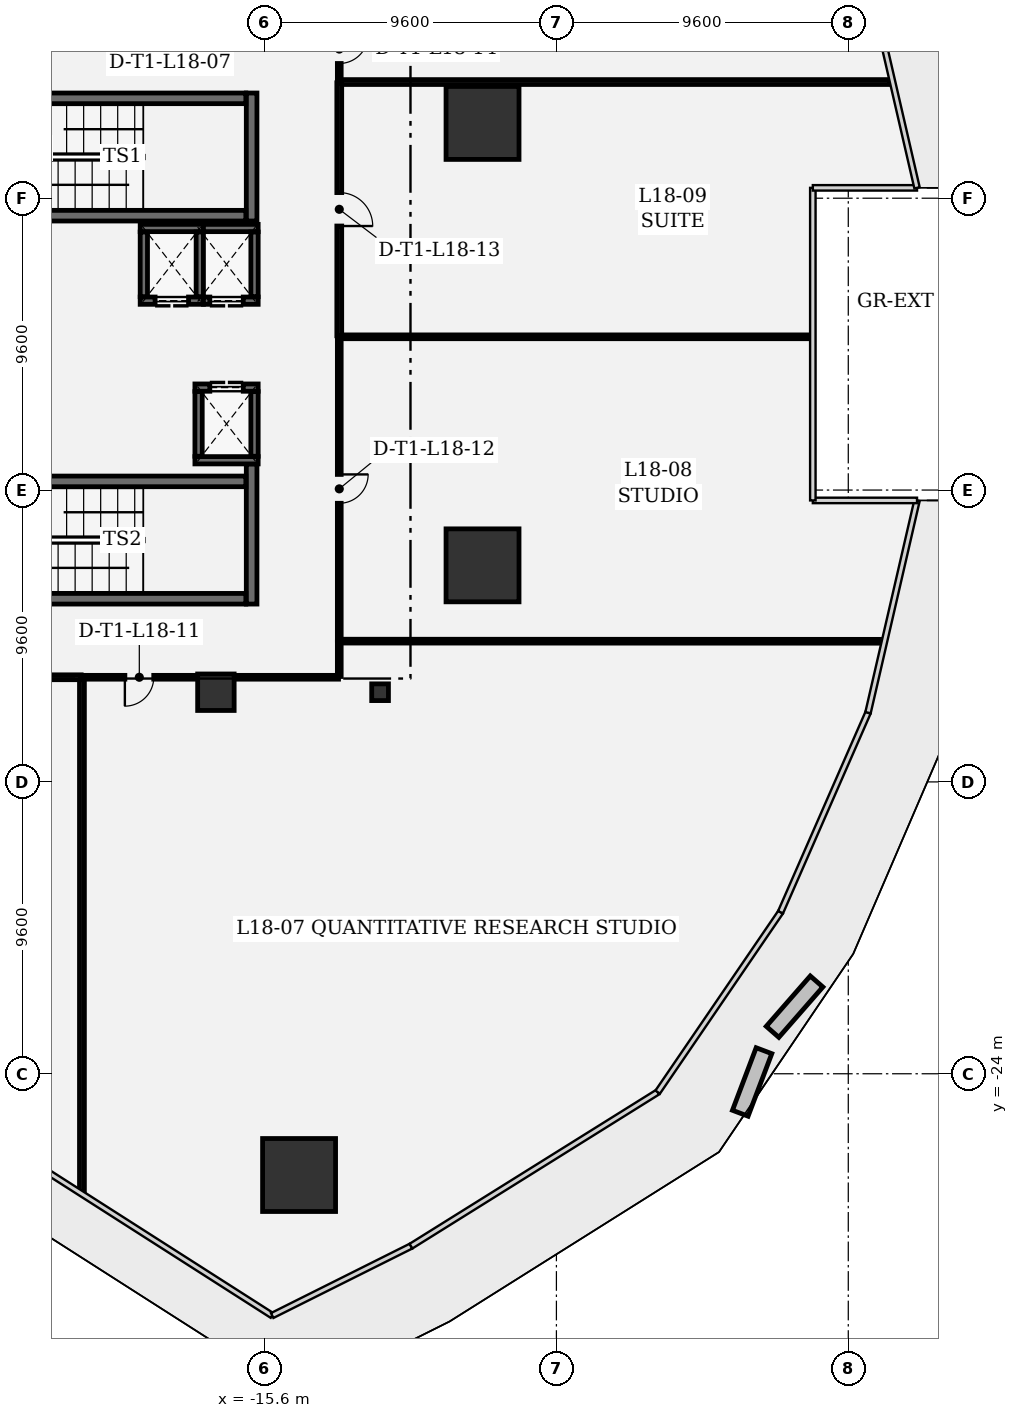
"""IFC4 building model, lengths in metres.
Left out: names, types, materials, properties, quantities, classifications, styles, units other than length and angle.
Written with IfcOpenShell. Run it as: python <this file> out.ifc"""

import sys

from ifc_helpers import new_model, si_unit, direction, frame, frame_2d, origin, origin_2d, place, context, subcontext, project, spatial, rectangle, extrude, element, fill, save


model = new_model("IFC4")
c1 = context("Model", 3, precision=1e-05, world=origin(), true_north=direction((0.0, 1.0)))
c2 = subcontext(c1, "Body", "Model", "MODEL_VIEW")
j1 = project(units=[si_unit("LENGTHUNIT", "METRE"), si_unit("PLANEANGLEUNIT", "RADIAN")], contexts=[c1])
p1 = place(None, origin())
s1 = spatial("IfcSite", under=j1, at=p1, CompositionType="ELEMENT")
p2 = place(p1, origin())
s2 = spatial("IfcBuilding", under=s1, at=p2, CompositionType="ELEMENT")
p3 = place(p2, frame((0.0, 0.0, 82.8)))
s3 = spatial("IfcBuildingStorey", under=s2, at=p3, CompositionType="ELEMENT", Elevation=82.8)
for number, where, z_axis, x_axis in (
    (1, (-14.464, -27.331, 0.0), (0.0, 0.0, 1.0), (1.0, 0.0, 0.0)),
    (2, (-8.43, -7.276, 0.0), (0.0, 0.0, 1.0), (1.0, 0.0, 0.0)),
    (3, (-8.43, 7.276, 0.0), (0.0, 0.0, 1.0), (1.0, 0.0, 0.0)),
):
    element("IfcColumn", number, at=place(p3, frame(where, z_axis=z_axis, x_axis=x_axis)), inside=s3, PredefinedType="COLUMN", context=c2, shape_type="SweptSolid", body=[
        extrude(rectangle(XDim=2.4, YDim=2.4, at=origin_2d()), origin(), (0.0, 0.0, 1.0), 4.2),
    ])
p4 = place(p3, frame((-17.2, -11.45, 0.0), z_axis=(0.0, 0.0, 1.0), x_axis=(1.0, 0.0, 0.0)))
e4 = element("IfcColumn", 4, at=p4, inside=s3, PredefinedType="COLUMN", context=c2, shape_type="SweptSolid", body=[
    extrude(rectangle(XDim=1.2, YDim=1.2, at=origin_2d()), origin(), (0.0, 0.0, 1.0), 4.2),
])
p5 = place(p3, frame((-11.8, -11.45, 0.0), z_axis=(0.0, 0.0, 1.0), x_axis=(1.0, 0.0, 0.0)))
e5 = element("IfcColumn", 5, at=p5, inside=s3, PredefinedType="COLUMN", context=c2, shape_type="SweptSolid", body=[
    extrude(rectangle(XDim=0.55, YDim=0.55, at=origin_2d()), origin(), (0.0, 0.0, 1.0), 4.2),
])
p6 = place(p3, frame((-16.025, 4.05, 0.0), z_axis=(0.0, 0.0, 1.0), x_axis=(0.0, 1.0, 0.0)))
e6 = element("IfcWall", 6, at=p6, inside=s3, PredefinedType="SHEAR", context=c2, shape_type="SweptSolid", body=[
    extrude(rectangle(XDim=4.21, YDim=0.35, at=frame_2d((2.105, 0.0))), origin(), (0.0, 0.0, 1.0), 3.92),
])
p7 = place(p3, frame((-24.335, 4.225, 0.0), z_axis=(0.0, 0.0, 1.0), x_axis=(1.0, 0.0, 0.0)))
e7 = element("IfcWall", 7, at=p7, inside=s3, PredefinedType="SHEAR", context=c2, shape_type="SweptSolid", body=[
    extrude(rectangle(XDim=8.12, YDim=0.35, at=frame_2d((4.06, 0.0))), origin(), (0.0, 0.0, 1.0), 3.92),
])
p8 = place(p3, frame((-16.215, 8.085, 0.0), z_axis=(0.0, 0.0, 1.0), x_axis=(-1.0, 0.0, 0.0)))
e8 = element("IfcWall", 8, at=p8, inside=s3, PredefinedType="SHEAR", context=c2, shape_type="SweptSolid", body=[
    extrude(rectangle(XDim=8.12, YDim=0.35, at=frame_2d((4.06, 0.0))), origin(), (0.0, 0.0, 1.0), 3.92),
])
p9 = place(p8, frame((6.74, 0.0, 0.0)))
e9 = element("IfcOpeningElement", 9, at=p9, cuts=e8, PredefinedType="OPENING", context=c2, shape_type="SweptSolid", body=[
    extrude(rectangle(XDim=1.1, YDim=2.2, at=frame_2d((0.55, 1.1))), frame((0.0, 0.185, 0.0), z_axis=(0.0, -1.0, 0.0), x_axis=(1.0, 0.0, 0.0)), (0.0, 0.0, 1.0), 0.37),
])
p10 = place(p3, frame((-16.025, -8.55, 0.0), z_axis=(0.0, 0.0, 1.0), x_axis=(0.0, 1.0, 0.0)))
e10 = element("IfcWall", 10, at=p10, inside=s3, PredefinedType="SHEAR", context=c2, shape_type="SweptSolid", body=[
    extrude(rectangle(XDim=4.61, YDim=0.35, at=frame_2d((2.305, 0.0))), origin(), (0.0, 0.0, 1.0), 3.92),
])
p11 = place(p3, frame((-24.335, -8.375, 0.0), z_axis=(0.0, 0.0, 1.0), x_axis=(1.0, 0.0, 0.0)))
e11 = element("IfcWall", 11, at=p11, inside=s3, PredefinedType="SHEAR", context=c2, shape_type="SweptSolid", body=[
    extrude(rectangle(XDim=8.12, YDim=0.35, at=frame_2d((4.06, 0.0))), origin(), (0.0, 0.0, 1.0), 3.92),
])
p12 = place(p11, frame((0.28, 0.0, 0.0)))
e12 = element("IfcOpeningElement", 12, at=p12, cuts=e11, PredefinedType="OPENING", context=c2, shape_type="SweptSolid", body=[
    extrude(rectangle(XDim=1.1, YDim=2.2, at=frame_2d((0.55, 1.1))), frame((0.0, 0.185, 0.0), z_axis=(0.0, -1.0, 0.0), x_axis=(1.0, 0.0, 0.0)), (0.0, 0.0, 1.0), 0.37),
])
p13 = place(p3, frame((-16.215, -4.515, 0.0), z_axis=(0.0, 0.0, 1.0), x_axis=(-1.0, 0.0, 0.0)))
e13 = element("IfcWall", 13, at=p13, inside=s3, PredefinedType="SHEAR", context=c2, shape_type="SweptSolid", body=[
    extrude(rectangle(XDim=8.12, YDim=0.35, at=frame_2d((4.06, 0.0))), origin(), (0.0, 0.0, 1.0), 3.92),
])
p14 = place(p3, frame((-17.61, 1.43, 0.0), z_axis=(0.0, 0.0, 1.0), x_axis=(-1.0, 0.0, 0.0)))
e14 = element("IfcWall", 14, at=p14, inside=s3, PredefinedType="SHEAR", context=c2, shape_type="SweptSolid", body=[
    extrude(rectangle(XDim=2.08, YDim=0.24, at=frame_2d((1.04, 0.0))), origin(), (0.0, 0.0, 1.0), 3.92),
])
p15 = place(p14, frame((0.49, 0.0, 0.0)))
e15 = element("IfcOpeningElement", 15, at=p15, cuts=e14, PredefinedType="OPENING", context=c2, shape_type="SweptSolid", body=[
    extrude(rectangle(XDim=1.1, YDim=2.2, at=frame_2d((0.55, 1.1))), frame((0.0, 0.13, 0.0), z_axis=(0.0, -1.0, 0.0), x_axis=(1.0, 0.0, 0.0)), (0.0, 0.0, 1.0), 0.26),
])
p16 = place(p3, frame((-19.69, 3.82, 0.0), z_axis=(0.0, 0.0, 1.0), x_axis=(1.0, 0.0, 0.0)))
e16 = element("IfcWall", 16, at=p16, inside=s3, PredefinedType="SHEAR", context=c2, shape_type="SweptSolid", body=[
    extrude(rectangle(XDim=2.08, YDim=0.24, at=frame_2d((1.04, 0.0))), origin(), (0.0, 0.0, 1.0), 3.92),
])
for number, where, z_axis, x_axis in (
    (17, (-19.57, 1.562, 0.0), (0.0, 0.0, 1.0), (0.0, 1.0, 0.0)),
    (18, (-17.73, 3.688, 0.0), (0.0, 0.0, 1.0), (0.0, -1.0, 0.0)),
):
    element("IfcWall", number, at=place(p3, frame(where, z_axis=z_axis, x_axis=x_axis)), inside=s3, PredefinedType="SHEAR", context=c2, shape_type="SweptSolid", body=[
        extrude(rectangle(XDim=2.126, YDim=0.24, at=frame_2d((1.063, 0.0))), origin(), (0.0, 0.0, 1.0), 3.92),
    ])
p17 = place(p3, frame((-15.81, 1.43, 0.0), z_axis=(0.0, 0.0, 1.0), x_axis=(-1.0, 0.0, 0.0)))
e19 = element("IfcWall", 19, at=p17, inside=s3, PredefinedType="SHEAR", context=c2, shape_type="SweptSolid", body=[
    extrude(rectangle(XDim=1.8, YDim=0.24, at=frame_2d((0.9, 0.0))), origin(), (0.0, 0.0, 1.0), 3.92),
])
p18 = place(p17, frame((0.49, 0.0, 0.0)))
e20 = element("IfcOpeningElement", 20, at=p18, cuts=e19, PredefinedType="OPENING", context=c2, shape_type="SweptSolid", body=[
    extrude(rectangle(XDim=1.1, YDim=2.2, at=frame_2d((0.55, 1.1))), frame((0.0, 0.13, 0.0), z_axis=(0.0, -1.0, 0.0), x_axis=(1.0, 0.0, 0.0)), (0.0, 0.0, 1.0), 0.26),
])
p19 = place(p3, frame((-17.61, 3.82, 0.0), z_axis=(0.0, 0.0, 1.0), x_axis=(1.0, 0.0, 0.0)))
e21 = element("IfcWall", 21, at=p19, inside=s3, PredefinedType="SHEAR", context=c2, shape_type="SweptSolid", body=[
    extrude(rectangle(XDim=1.8, YDim=0.24, at=frame_2d((0.9, 0.0))), origin(), (0.0, 0.0, 1.0), 3.92),
])
p20 = place(p3, frame((-15.93, 3.688, 0.0), z_axis=(0.0, 0.0, 1.0), x_axis=(0.0, -1.0, 0.0)))
e22 = element("IfcWall", 22, at=p20, inside=s3, PredefinedType="SHEAR", context=c2, shape_type="SweptSolid", body=[
    extrude(rectangle(XDim=2.126, YDim=0.24, at=frame_2d((1.063, 0.0))), origin(), (0.0, 0.0, 1.0), 3.92),
])
p21 = place(p3, frame((-15.81, -3.82, 0.0), z_axis=(0.0, 0.0, 1.0), x_axis=(-1.0, 0.0, 0.0)))
e23 = element("IfcWall", 23, at=p21, inside=s3, PredefinedType="SHEAR", context=c2, shape_type="SweptSolid", body=[
    extrude(rectangle(XDim=2.08, YDim=0.24, at=frame_2d((1.04, 0.0))), origin(), (0.0, 0.0, 1.0), 3.92),
])
p22 = place(p3, frame((-17.89, -1.43, 0.0), z_axis=(0.0, 0.0, 1.0), x_axis=(1.0, 0.0, 0.0)))
e24 = element("IfcWall", 24, at=p22, inside=s3, PredefinedType="SHEAR", context=c2, shape_type="SweptSolid", body=[
    extrude(rectangle(XDim=2.08, YDim=0.24, at=frame_2d((1.04, 0.0))), origin(), (0.0, 0.0, 1.0), 3.92),
])
p23 = place(p22, frame((0.49, 0.0, 0.0)))
e25 = element("IfcOpeningElement", 25, at=p23, cuts=e24, PredefinedType="OPENING", context=c2, shape_type="SweptSolid", body=[
    extrude(rectangle(XDim=1.1, YDim=2.2, at=frame_2d((0.55, 1.1))), frame((0.0, 0.13, 0.0), z_axis=(0.0, -1.0, 0.0), x_axis=(1.0, 0.0, 0.0)), (0.0, 0.0, 1.0), 0.26),
])
for number, where, z_axis, x_axis in (
    (26, (-17.77, -3.688, 0.0), (0.0, 0.0, 1.0), (0.0, 1.0, 0.0)),
    (27, (-15.93, -1.562, 0.0), (0.0, 0.0, 1.0), (0.0, -1.0, 0.0)),
):
    element("IfcWall", number, at=place(p3, frame(where, z_axis=z_axis, x_axis=x_axis)), inside=s3, PredefinedType="SHEAR", context=c2, shape_type="SweptSolid", body=[
        extrude(rectangle(XDim=2.126, YDim=0.24, at=frame_2d((1.063, 0.0))), origin(), (0.0, 0.0, 1.0), 3.92),
    ])
p24 = place(p3, frame((-21.606, -27.874, 0.0), z_axis=(0.0, 0.0, 1.0), x_axis=(0.0, 1.0, 0.0)))
e28 = element("IfcWall", 28, at=p24, inside=s3, PredefinedType="PARTITIONING", context=c2, shape_type="SweptSolid", body=[
    extrude(rectangle(XDim=16.891, YDim=0.16, at=frame_2d((8.446, 0.0))), origin(), (0.0, 0.0, 1.0), 2.957),
])
p25 = place(p3, frame((-21.631, -10.958, 0.0), z_axis=(0.0, 0.0, 1.0), x_axis=(-1.0, 0.0, 0.0)))
e29 = element("IfcWall", 29, at=p25, inside=s3, PredefinedType="PARTITIONING", context=c2, shape_type="SweptSolid", body=[
    extrude(rectangle(XDim=1.304, YDim=0.16, at=frame_2d((0.652, 0.0))), origin(), (0.0, 0.0, 1.0), 3.92),
])
p26 = place(p3, frame((4.712, -9.774, 0.0), z_axis=(0.0, 0.0, 1.0), x_axis=(-0.999999966154, 0.000260177734, 0.0)))
e30 = element("IfcWall", 30, at=p26, inside=s3, PredefinedType="PARTITIONING", context=c2, shape_type="SweptSolid", body=[
    extrude(rectangle(XDim=17.829, YDim=0.125, at=frame_2d((8.915, 0.0))), origin(), (0.0, 0.0, 1.0), 2.957),
])
p27 = place(p3, frame((-13.142, -9.794, 0.0), z_axis=(0.0, 0.0, 1.0), x_axis=(0.0, -1.0, 0.0)))
e31 = element("IfcWall", 31, at=p27, inside=s3, PredefinedType="PARTITIONING", context=c2, shape_type="SweptSolid", body=[
    extrude(rectangle(XDim=1.139, YDim=0.125, at=frame_2d((0.569, 0.0))), origin(), (0.0, 0.0, 1.0), 3.92),
])
p28 = place(p3, frame((-13.167, -10.958, 0.0), z_axis=(0.0, 0.0, 1.0), x_axis=(-1.0, 0.0, 0.0)))
e32 = element("IfcWall", 32, at=p28, inside=s3, PredefinedType="PARTITIONING", context=c2, shape_type="SweptSolid", body=[
    extrude(rectangle(XDim=3.368, YDim=0.125, at=frame_2d((1.684, 0.0))), origin(), (0.0, 0.0, 1.0), 2.957),
])
p29 = place(p3, frame((-17.865, -10.958, 0.0), z_axis=(0.0, 0.0, 1.0), x_axis=(-1.0, 0.0, 0.0)))
e33 = element("IfcWall", 33, at=p29, inside=s3, PredefinedType="PARTITIONING", context=c2, shape_type="SweptSolid", body=[
    extrude(rectangle(XDim=3.708, YDim=0.125, at=frame_2d((1.854, 0.0))), origin(), (0.0, 0.0, 1.0), 3.92),
])
p30 = place(p29, frame((1.379, 0.0, 0.0)))
e34 = element("IfcOpeningElement", 34, at=p30, cuts=e33, PredefinedType="OPENING", context=c2, shape_type="SweptSolid", body=[
    extrude(rectangle(XDim=0.95, YDim=2.15, at=frame_2d((0.475, 1.075))), frame((0.0, 0.073, 0.0), z_axis=(0.0, -1.0, 0.0), x_axis=(1.0, 0.0, 0.0)), (0.0, 0.0, 1.0), 0.145),
])
p31 = place(p3, frame((2.354, 0.241, 0.0), z_axis=(0.0, 0.0, 1.0), x_axis=(-1.0, 0.0, 0.0)))
e35 = element("IfcWall", 35, at=p31, inside=s3, PredefinedType="PARTITIONING", context=c2, shape_type="SweptSolid", body=[
    extrude(rectangle(XDim=15.471, YDim=0.125, at=frame_2d((7.736, 0.0))), origin(), (0.0, 0.0, 1.0), 3.92),
])
p32 = place(p3, frame((-13.142, 0.216, 0.0), z_axis=(0.0, 0.0, 1.0), x_axis=(0.0, -1.0, 0.0)))
e36 = element("IfcWall", 36, at=p32, inside=s3, PredefinedType="PARTITIONING", context=c2, shape_type="SweptSolid", body=[
    extrude(rectangle(XDim=9.953, YDim=0.125, at=frame_2d((4.976, 0.0))), origin(), (0.0, 0.0, 1.0), 3.92),
])
p33 = place(p32, frame((4.501, 0.0, 0.0)))
e37 = element("IfcOpeningElement", 37, at=p33, cuts=e36, PredefinedType="OPENING", context=c2, shape_type="SweptSolid", body=[
    extrude(rectangle(XDim=0.95, YDim=2.15, at=frame_2d((0.475, 1.075))), frame((0.0, 0.073, 0.0), z_axis=(0.0, -1.0, 0.0), x_axis=(1.0, 0.0, 0.0)), (0.0, 0.0, 1.0), 0.145),
])
p34 = place(p3, frame((4.978, 8.621, 0.0), z_axis=(0.0, 0.0, 1.0), x_axis=(-1.0, 0.0, 0.0)))
e38 = element("IfcWall", 38, at=p34, inside=s3, PredefinedType="PARTITIONING", context=c2, shape_type="SweptSolid", body=[
    extrude(rectangle(XDim=18.095, YDim=0.16, at=frame_2d((9.047, 0.0))), origin(), (0.0, 0.0, 1.0), 2.957),
])
p35 = place(p3, frame((-13.142, 8.596, 0.0), z_axis=(0.0, 0.0, 1.0), x_axis=(0.0, -1.0, 0.0)))
e39 = element("IfcWall", 39, at=p35, inside=s3, PredefinedType="PARTITIONING", context=c2, shape_type="SweptSolid", body=[
    extrude(rectangle(XDim=8.322, YDim=0.16, at=frame_2d((4.161, 0.0))), origin(), (0.0, 0.0, 1.0), 3.92),
])
p36 = place(p35, frame((3.611, 0.0, 0.0)))
e40 = element("IfcOpeningElement", 40, at=p36, cuts=e39, PredefinedType="OPENING", context=c2, shape_type="SweptSolid", body=[
    extrude(rectangle(XDim=1.1, YDim=2.15, at=frame_2d((0.55, 1.075))), frame((0.0, 0.09, 0.0), z_axis=(0.0, -1.0, 0.0), x_axis=(1.0, 0.0, 0.0)), (0.0, 0.0, 1.0), 0.18),
])
p37 = place(p3, frame((-13.142, 10.758, 0.0), z_axis=(0.0, 0.0, 1.0), x_axis=(0.0, -1.0, 0.0)))
e41 = element("IfcWall", 41, at=p37, inside=s3, PredefinedType="PARTITIONING", context=c2, shape_type="SweptSolid", body=[
    extrude(rectangle(XDim=2.104, YDim=0.125, at=frame_2d((1.052, 0.0))), origin(), (0.0, 0.0, 1.0), 3.92),
])
p38 = place(p37, frame((0.577, 0.0, 0.0)))
e42 = element("IfcOpeningElement", 42, at=p38, cuts=e41, PredefinedType="OPENING", context=c2, shape_type="SweptSolid", body=[
    extrude(rectangle(XDim=0.95, YDim=2.15, at=frame_2d((0.475, 1.075))), frame((0.0, 0.073, 0.0), z_axis=(0.0, -1.0, 0.0), x_axis=(1.0, 0.0, 0.0)), (0.0, 0.0, 1.0), 0.145),
])
p39 = place(p15, origin())
e43 = element("IfcDoor", 43, at=p39, inside=s3, OperationType="DOUBLE_DOOR_SLIDING", PredefinedType="DOOR", context=c2, shape_type="SweptSolid", body=[
    extrude(rectangle(XDim=1.1, YDim=2.2, at=frame_2d((0.55, 1.1))), frame((0.0, 0.025, 0.0), z_axis=(0.0, -1.0, 0.0), x_axis=(1.0, 0.0, 0.0)), (0.0, 0.0, 1.0), 0.05),
])
fill(e15, e43)
p40 = place(p18, origin())
e44 = element("IfcDoor", 44, at=p40, inside=s3, OperationType="DOUBLE_DOOR_SLIDING", PredefinedType="DOOR", context=c2, shape_type="SweptSolid", body=[
    extrude(rectangle(XDim=1.1, YDim=2.2, at=frame_2d((0.55, 1.1))), frame((0.0, 0.025, 0.0), z_axis=(0.0, -1.0, 0.0), x_axis=(1.0, 0.0, 0.0)), (0.0, 0.0, 1.0), 0.05),
])
fill(e20, e44)
p41 = place(p23, origin())
e45 = element("IfcDoor", 45, at=p41, inside=s3, OperationType="DOUBLE_DOOR_SLIDING", PredefinedType="DOOR", context=c2, shape_type="SweptSolid", body=[
    extrude(rectangle(XDim=1.1, YDim=2.2, at=frame_2d((0.55, 1.1))), frame((0.0, 0.025, 0.0), z_axis=(0.0, -1.0, 0.0), x_axis=(1.0, 0.0, 0.0)), (0.0, 0.0, 1.0), 0.05),
])
fill(e25, e45)
p42 = place(p30, origin())
e46 = element("IfcDoor", 46, at=p42, inside=s3, OperationType="SINGLE_SWING_RIGHT", PredefinedType="DOOR", context=c2, shape_type="SweptSolid", body=[
    extrude(rectangle(XDim=0.95, YDim=2.15, at=frame_2d((0.475, 1.075))), frame((0.0, 0.025, 0.0), z_axis=(0.0, -1.0, 0.0), x_axis=(1.0, 0.0, 0.0)), (0.0, 0.0, 1.0), 0.05),
])
fill(e34, e46)
p43 = place(p33, origin())
e47 = element("IfcDoor", 47, at=p43, inside=s3, OperationType="SINGLE_SWING_LEFT", PredefinedType="DOOR", context=c2, shape_type="SweptSolid", body=[
    extrude(rectangle(XDim=0.95, YDim=2.15, at=frame_2d((0.475, 1.075))), frame((0.0, 0.025, 0.0), z_axis=(0.0, -1.0, 0.0), x_axis=(1.0, 0.0, 0.0)), (0.0, 0.0, 1.0), 0.05),
])
fill(e37, e47)
p44 = place(p36, origin())
e48 = element("IfcDoor", 48, at=p44, inside=s3, OperationType="SINGLE_SWING_RIGHT", PredefinedType="DOOR", context=c2, shape_type="SweptSolid", body=[
    extrude(rectangle(XDim=1.1, YDim=2.15, at=frame_2d((0.55, 1.075))), frame((0.0, 0.025, 0.0), z_axis=(0.0, -1.0, 0.0), x_axis=(1.0, 0.0, 0.0)), (0.0, 0.0, 1.0), 0.05),
])
fill(e40, e48)
p45 = place(p38, origin())
e49 = element("IfcDoor", 49, at=p45, inside=s3, OperationType="SINGLE_SWING_LEFT", PredefinedType="DOOR", context=c2, shape_type="SweptSolid", body=[
    extrude(rectangle(XDim=0.95, YDim=2.15, at=frame_2d((0.475, 1.075))), frame((0.0, 0.025, 0.0), z_axis=(0.0, -1.0, 0.0), x_axis=(1.0, 0.0, 0.0)), (0.0, 0.0, 1.0), 0.05),
])
fill(e42, e49)
save(model, sys.argv[1])
